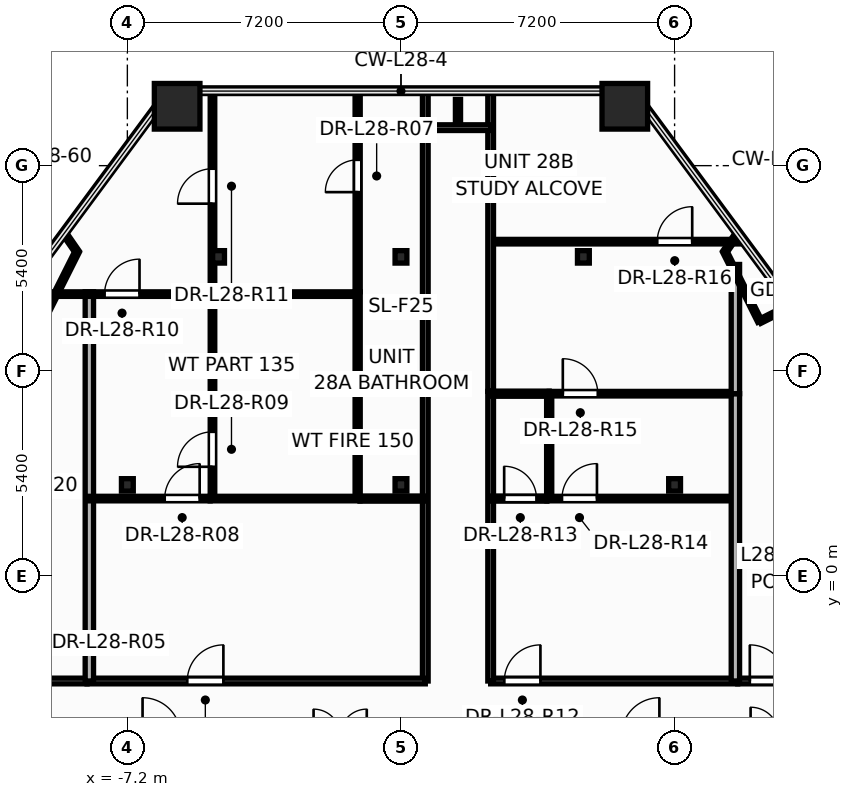
"""IFC4 building model, lengths in metres.
Left out: names, types, materials, properties, quantities, classifications, styles, units other than length and angle.
Written with IfcOpenShell. Run it as: python <this file> out.ifc"""

import sys

from ifc_helpers import new_model, si_unit, direction, frame, frame_2d, origin, origin_2d, place, context, subcontext, project, spatial, rectangle, hollow_rectangle, i_section, extrude, element, fill, save


model = new_model("IFC4")
c1 = context("Model", 3, precision=1e-05, world=origin(), true_north=direction((0.0, 1.0)))
c2 = subcontext(c1, "Body", "Model", "MODEL_VIEW")
j1 = project(units=[si_unit("LENGTHUNIT", "METRE"), si_unit("PLANEANGLEUNIT", "RADIAN")], contexts=[c1])
p1 = place(None, origin())
s1 = spatial("IfcSite", under=j1, at=p1, CompositionType="ELEMENT")
p2 = place(p1, origin())
s2 = spatial("IfcBuilding", under=s1, at=p2, CompositionType="ELEMENT")
p3 = place(p2, frame((0.0, 0.0, 110.4)))
s3 = spatial("IfcBuildingStorey", under=s2, at=p3, CompositionType="ELEMENT", Elevation=110.4)
for number, where, z_axis, x_axis in (
    (1, (5.89, 12.362, 0.0), (0.0, 0.0, 1.0), (1.0, 0.0, 0.0)),
    (2, (-5.89, 12.362, 0.0), (0.0, 0.0, 1.0), (1.0, 0.0, 0.0)),
):
    element("IfcColumn", number, at=place(p3, frame(where, z_axis=z_axis, x_axis=x_axis)), inside=s3, PredefinedType="COLUMN", context=c2, shape_type="SweptSolid", body=[
        extrude(hollow_rectangle(XDim=1.2, YDim=1.2, WallThickness=0.055, at=origin_2d()), origin(), (0.0, 0.0, 1.0), 3.6),
    ])
for number, where, z_axis, x_axis in (
    (3, (-7.2, 2.4, 0.0), (0.0, 0.0, 1.0), (1.0, 0.0, 0.0)),
    (4, (0.0, 2.4, 0.0), (0.0, 0.0, 1.0), (1.0, 0.0, 0.0)),
    (5, (7.2, 2.4, 0.0), (0.0, 0.0, 1.0), (1.0, 0.0, 0.0)),
    (6, (-4.8, 8.4, 0.0), (0.0, 0.0, 1.0), (1.0, 0.0, 0.0)),
    (7, (0.0, 8.4, 0.0), (0.0, 0.0, 1.0), (1.0, 0.0, 0.0)),
    (8, (4.8, 8.4, 0.0), (0.0, 0.0, 1.0), (1.0, 0.0, 0.0)),
):
    element("IfcColumn", number, at=place(p3, frame(where, z_axis=z_axis, x_axis=x_axis)), inside=s3, PredefinedType="COLUMN", context=c2, shape_type="SweptSolid", body=[
        extrude(i_section(OverallWidth=0.311, OverallDepth=0.327, WebThickness=0.016, FlangeThickness=0.025, at=origin_2d()), origin(), (0.0, 0.0, 1.0), 3.6),
    ])
p4 = place(p3, frame((0.64, -2.76, 0.0), z_axis=(0.0, 0.0, 1.0), x_axis=(0.0, 1.0, 0.0)))
e9 = element("IfcWall", 9, at=p4, inside=s3, PredefinedType="PARTITIONING", context=c2, shape_type="SweptSolid", body=[
    extrude(rectangle(XDim=15.522, YDim=0.15, at=frame_2d((7.761, 0.0))), origin(), (0.0, 0.0, 1.0), 2.325),
])
p5 = place(p3, frame((-8.26, -2.76, 0.0), z_axis=(0.0, 0.0, 1.0), x_axis=(1.0, 0.0, 0.0)))
e10 = element("IfcWall", 10, at=p5, inside=s3, PredefinedType="PARTITIONING", context=c2, shape_type="SweptSolid", body=[
    extrude(rectangle(XDim=8.9, YDim=0.15, at=frame_2d((4.45, 0.0))), origin(), (0.0, 0.0, 1.0), 2.325),
])
p6 = place(p5, frame((2.637, 0.0, 0.0)))
e11 = element("IfcOpeningElement", 11, at=p6, cuts=e10, PredefinedType="OPENING", context=c2, shape_type="SweptSolid", body=[
    extrude(rectangle(XDim=0.956, YDim=2.104, at=frame_2d((0.475, 1.052))), frame((0.0, 0.085, 0.0), z_axis=(0.0, -1.0, 0.0), x_axis=(1.0, 0.0, 0.0)), (0.0, 0.0, 1.0), 0.17),
])
p7 = place(p3, frame((2.36, 8.8, 0.0), z_axis=(0.0, 0.0, 1.0), x_axis=(1.0, 0.0, 0.0)))
e12 = element("IfcWall", 12, at=p7, inside=s3, PredefinedType="PARTITIONING", context=c2, shape_type="SweptSolid", body=[
    extrude(rectangle(XDim=6.56, YDim=0.12, at=frame_2d((3.28, 0.0))), origin(), (0.0, 0.0, 1.0), 2.325),
])
p8 = place(p7, frame((4.384, 0.0, 0.0)))
e13 = element("IfcOpeningElement", 13, at=p8, cuts=e12, PredefinedType="OPENING", context=c2, shape_type="SweptSolid", body=[
    extrude(rectangle(XDim=0.926, YDim=2.104, at=frame_2d((0.46, 1.052))), frame((0.0, 0.07, 0.0), z_axis=(0.0, -1.0, 0.0), x_axis=(1.0, 0.0, 0.0)), (0.0, 0.0, 1.0), 0.14),
])
p9 = place(p3, frame((-14.64, -2.76, 0.0), z_axis=(0.0, 0.0, 1.0), x_axis=(1.0, 0.0, 0.0)))
e14 = element("IfcWall", 14, at=p9, inside=s3, PredefinedType="PARTITIONING", context=c2, shape_type="SweptSolid", body=[
    extrude(rectangle(XDim=6.378, YDim=0.15, at=frame_2d((3.189, 0.0))), origin(), (0.0, 0.0, 1.0), 3.35),
])
p10 = place(p9, frame((3.873, 0.0, 0.0)))
e15 = element("IfcOpeningElement", 15, at=p10, cuts=e14, PredefinedType="OPENING", context=c2, shape_type="SweptSolid", body=[
    extrude(rectangle(XDim=0.956, YDim=2.104, at=frame_2d((0.475, 1.052))), frame((0.0, 0.085, 0.0), z_axis=(0.0, -1.0, 0.0), x_axis=(1.0, 0.0, 0.0)), (0.0, 0.0, 1.0), 0.17),
])
p11 = place(p3, frame((2.36, -2.76, 0.0), z_axis=(0.0, 0.0, 1.0), x_axis=(1.0, 0.0, 0.0)))
e16 = element("IfcWall", 16, at=p11, inside=s3, PredefinedType="PARTITIONING", context=c2, shape_type="SweptSolid", body=[
    extrude(rectangle(XDim=6.5, YDim=0.15, at=frame_2d((3.25, 0.0))), origin(), (0.0, 0.0, 1.0), 2.325),
])
p12 = place(p11, frame((0.36, 0.0, 0.0)))
e17 = element("IfcOpeningElement", 17, at=p12, cuts=e16, PredefinedType="OPENING", context=c2, shape_type="SweptSolid", body=[
    extrude(rectangle(XDim=0.956, YDim=2.104, at=frame_2d((0.475, 1.052))), frame((0.0, 0.085, 0.0), z_axis=(0.0, -1.0, 0.0), x_axis=(1.0, 0.0, 0.0)), (0.0, 0.0, 1.0), 0.17),
])
p13 = place(p3, frame((8.862, -2.76, 0.0), z_axis=(0.0, 0.0, 1.0), x_axis=(1.0, 0.0, 0.0)))
e18 = element("IfcWall", 18, at=p13, inside=s3, PredefinedType="PARTITIONING", context=c2, shape_type="SweptSolid", body=[
    extrude(rectangle(XDim=5.778, YDim=0.15, at=frame_2d((2.889, 0.0))), origin(), (0.0, 0.0, 1.0), 3.35),
])
p14 = place(p13, frame((0.317, 0.0, 0.0)))
e19 = element("IfcOpeningElement", 19, at=p14, cuts=e18, PredefinedType="OPENING", context=c2, shape_type="SweptSolid", body=[
    extrude(rectangle(XDim=0.956, YDim=2.104, at=frame_2d((0.475, 1.052))), frame((0.0, 0.085, 0.0), z_axis=(0.0, -1.0, 0.0), x_axis=(1.0, 0.0, 0.0)), (0.0, 0.0, 1.0), 0.17),
])
p15 = place(p3, frame((-8.2, -2.76, 0.0), z_axis=(0.0, 0.0, 1.0), x_axis=(0.0, 1.0, 0.0)))
e20 = element("IfcWall", 20, at=p15, inside=s3, PredefinedType="PARTITIONING", context=c2, shape_type="SweptSolid", body=[
    extrude(rectangle(XDim=10.24, YDim=0.22, at=frame_2d((5.12, 0.0))), origin(), (0.0, 0.0, 1.0), 2.325),
])
p16 = place(p3, frame((-1.14, 2.04, 0.0), z_axis=(0.0, 0.0, 1.0), x_axis=(0.0, 1.0, 0.0)))
e21 = element("IfcWall", 21, at=p16, inside=s3, PredefinedType="PARTITIONING", context=c2, shape_type="SweptSolid", body=[
    extrude(rectangle(XDim=5.44, YDim=0.135, at=frame_2d((2.72, 0.0))), origin(), (0.0, 0.0, 1.0), 2.325),
])
p17 = place(p3, frame((-1.14, 7.482, 0.0), z_axis=(0.0, 0.0, 1.0), x_axis=(0.0, 1.0, 0.0)))
e22 = element("IfcWall", 22, at=p17, inside=s3, PredefinedType="PARTITIONING", context=c2, shape_type="SweptSolid", body=[
    extrude(rectangle(XDim=5.28, YDim=0.135, at=frame_2d((2.64, 0.0))), origin(), (0.0, 0.0, 1.0), 2.325),
])
p18 = place(p17, frame((2.621, 0.0, 0.0)))
e23 = element("IfcOpeningElement", 23, at=p18, cuts=e22, PredefinedType="OPENING", context=c2, shape_type="SweptSolid", body=[
    extrude(rectangle(XDim=0.856, YDim=2.104, at=frame_2d((0.425, 1.052))), frame((0.0, 0.078, 0.0), z_axis=(0.0, -1.0, 0.0), x_axis=(1.0, 0.0, 0.0)), (0.0, 0.0, 1.0), 0.155),
])
p19 = place(p3, frame((-4.96, 2.04, 0.0), z_axis=(0.0, 0.0, 1.0), x_axis=(0.0, 1.0, 0.0)))
e24 = element("IfcWall", 24, at=p19, inside=s3, PredefinedType="PARTITIONING", context=c2, shape_type="SweptSolid", body=[
    extrude(rectangle(XDim=5.38, YDim=0.12, at=frame_2d((2.69, 0.0))), origin(), (0.0, 0.0, 1.0), 2.325),
])
p20 = place(p19, frame((0.837, 0.0, 0.0)))
e25 = element("IfcOpeningElement", 25, at=p20, cuts=e24, PredefinedType="OPENING", context=c2, shape_type="SweptSolid", body=[
    extrude(rectangle(XDim=0.926, YDim=2.104, at=frame_2d((0.46, 1.052))), frame((0.0, 0.07, 0.0), z_axis=(0.0, -1.0, 0.0), x_axis=(1.0, 0.0, 0.0)), (0.0, 0.0, 1.0), 0.14),
])
p21 = place(p3, frame((-4.96, 7.42, 0.0), z_axis=(0.0, 0.0, 1.0), x_axis=(0.0, 1.0, 0.0)))
e26 = element("IfcWall", 26, at=p21, inside=s3, PredefinedType="PARTITIONING", context=c2, shape_type="SweptSolid", body=[
    extrude(rectangle(XDim=5.342, YDim=0.12, at=frame_2d((2.671, 0.0))), origin(), (0.0, 0.0, 1.0), 2.325),
])
p22 = place(p21, frame((2.38, 0.0, 0.0)))
e27 = element("IfcOpeningElement", 27, at=p22, cuts=e26, PredefinedType="OPENING", context=c2, shape_type="SweptSolid", body=[
    extrude(rectangle(XDim=0.926, YDim=2.104, at=frame_2d((0.46, 1.052))), frame((0.0, 0.07, 0.0), z_axis=(0.0, -1.0, 0.0), x_axis=(1.0, 0.0, 0.0)), (0.0, 0.0, 1.0), 0.14),
])
p23 = place(p3, frame((-10.045, 7.42, 0.0), z_axis=(0.0, 0.0, 1.0), x_axis=(1.0, 0.0, 0.0)))
e28 = element("IfcWall", 28, at=p23, inside=s3, PredefinedType="PARTITIONING", context=c2, shape_type="SweptSolid", body=[
    extrude(rectangle(XDim=5.085, YDim=0.12, at=frame_2d((2.543, 0.0))), origin(), (0.0, 0.0, 1.0), 2.325),
])
p24 = place(p23, frame((2.246, 0.0, 0.0)))
e29 = element("IfcOpeningElement", 29, at=p24, cuts=e28, PredefinedType="OPENING", context=c2, shape_type="SweptSolid", body=[
    extrude(rectangle(XDim=0.926, YDim=2.104, at=frame_2d((0.46, 1.052))), frame((0.0, 0.07, 0.0), z_axis=(0.0, -1.0, 0.0), x_axis=(1.0, 0.0, 0.0)), (0.0, 0.0, 1.0), 0.14),
])
p25 = place(p3, frame((3.84, 2.04, 0.0), z_axis=(0.0, 0.0, 1.0), x_axis=(1.0, 0.0, 0.0)))
e30 = element("IfcWall", 30, at=p25, inside=s3, PredefinedType="PARTITIONING", context=c2, shape_type="SweptSolid", body=[
    extrude(rectangle(XDim=4.96, YDim=0.12, at=frame_2d((2.48, 0.0))), origin(), (0.0, 0.0, 1.0), 2.325),
])
p26 = place(p25, frame((0.397, 0.0, 0.0)))
e31 = element("IfcOpeningElement", 31, at=p26, cuts=e30, PredefinedType="OPENING", context=c2, shape_type="SweptSolid", body=[
    extrude(rectangle(XDim=0.926, YDim=2.104, at=frame_2d((0.46, 1.052))), frame((0.0, 0.07, 0.0), z_axis=(0.0, -1.0, 0.0), x_axis=(1.0, 0.0, 0.0)), (0.0, 0.0, 1.0), 0.14),
])
p27 = place(p3, frame((3.9, 4.8, 0.0), z_axis=(0.0, 0.0, 1.0), x_axis=(1.0, 0.0, 0.0)))
e32 = element("IfcWall", 32, at=p27, inside=s3, PredefinedType="PARTITIONING", context=c2, shape_type="SweptSolid", body=[
    extrude(rectangle(XDim=4.9, YDim=0.12, at=frame_2d((2.45, 0.0))), origin(), (0.0, 0.0, 1.0), 2.325),
])
p28 = place(p27, frame((0.359, 0.0, 0.0)))
e33 = element("IfcOpeningElement", 33, at=p28, cuts=e32, PredefinedType="OPENING", context=c2, shape_type="SweptSolid", body=[
    extrude(rectangle(XDim=0.926, YDim=2.104, at=frame_2d((0.46, 1.052))), frame((0.0, 0.07, 0.0), z_axis=(0.0, -1.0, 0.0), x_axis=(1.0, 0.0, 0.0)), (0.0, 0.0, 1.0), 0.14),
])
p29 = place(p3, frame((2.36, -2.76, 0.0), z_axis=(0.0, 0.0, 1.0), x_axis=(0.0, 1.0, 0.0)))
e34 = element("IfcWall", 34, at=p29, inside=s3, PredefinedType="PARTITIONING", context=c2, shape_type="SweptSolid", body=[
    extrude(rectangle(XDim=7.62, YDim=0.15, at=frame_2d((3.81, 0.0))), origin(), (0.0, 0.0, 1.0), 2.325),
])
p30 = place(p3, frame((8.8, -2.76, 0.0), z_axis=(0.0, 0.0, 1.0), x_axis=(0.0, 1.0, 0.0)))
e35 = element("IfcWall", 35, at=p30, inside=s3, PredefinedType="PARTITIONING", context=c2, shape_type="SweptSolid", body=[
    extrude(rectangle(XDim=7.56, YDim=0.22, at=frame_2d((3.78, 0.0))), origin(), (0.0, 0.0, 1.0), 2.325),
])
p31 = place(p3, frame((2.36, 4.862, 0.0), z_axis=(0.0, 0.0, 1.0), x_axis=(0.0, 1.0, 0.0)))
e36 = element("IfcWall", 36, at=p31, inside=s3, PredefinedType="PARTITIONING", context=c2, shape_type="SweptSolid", body=[
    extrude(rectangle(XDim=7.9, YDim=0.15, at=frame_2d((3.95, 0.0))), origin(), (0.0, 0.0, 1.0), 2.325),
])
p32 = place(p3, frame((-5.02, 2.04, 0.0), z_axis=(0.0, 0.0, 1.0), x_axis=(1.0, 0.0, 0.0)))
e37 = element("IfcWall", 37, at=p32, inside=s3, PredefinedType="PARTITIONING", context=c2, shape_type="SweptSolid", body=[
    extrude(rectangle(XDim=3.94, YDim=0.12, at=frame_2d((1.97, 0.0))), origin(), (0.0, 0.0, 1.0), 2.919),
])
p33 = place(p3, frame((-4.96, 7.42, 0.0), z_axis=(0.0, 0.0, 1.0), x_axis=(1.0, 0.0, 0.0)))
e38 = element("IfcWall", 38, at=p33, inside=s3, PredefinedType="PARTITIONING", context=c2, shape_type="SweptSolid", body=[
    extrude(rectangle(XDim=3.82, YDim=0.12, at=frame_2d((1.91, 0.0))), origin(), (0.0, 0.0, 1.0), 2.325),
])
p34 = place(p3, frame((8.8, 4.8, 0.0), z_axis=(0.0, 0.0, 1.0), x_axis=(0.0, 1.0, 0.0)))
e39 = element("IfcWall", 39, at=p34, inside=s3, PredefinedType="PARTITIONING", context=c2, shape_type="SweptSolid", body=[
    extrude(rectangle(XDim=3.4, YDim=0.22, at=frame_2d((1.7, 0.0))), origin(), (0.0, 0.0, 1.0), 2.325),
])
p35 = place(p3, frame((-8.2, 2.04, 0.0), z_axis=(0.0, 0.0, 1.0), x_axis=(1.0, 0.0, 0.0)))
e40 = element("IfcWall", 40, at=p35, inside=s3, PredefinedType="PARTITIONING", context=c2, shape_type="SweptSolid", body=[
    extrude(rectangle(XDim=3.178, YDim=0.12, at=frame_2d((1.589, 0.0))), origin(), (0.0, 0.0, 1.0), 2.325),
])
p36 = place(p35, frame((1.983, 0.0, 0.0)))
e41 = element("IfcOpeningElement", 41, at=p36, cuts=e40, PredefinedType="OPENING", context=c2, shape_type="SweptSolid", body=[
    extrude(rectangle(XDim=0.926, YDim=2.104, at=frame_2d((0.46, 1.052))), frame((0.0, 0.07, 0.0), z_axis=(0.0, -1.0, 0.0), x_axis=(1.0, 0.0, 0.0)), (0.0, 0.0, 1.0), 0.14),
])
p37 = place(p3, frame((3.9, 2.04, 0.0), z_axis=(0.0, 0.0, 1.0), x_axis=(0.0, 1.0, 0.0)))
e42 = element("IfcWall", 42, at=p37, inside=s3, PredefinedType="PARTITIONING", context=c2, shape_type="SweptSolid", body=[
    extrude(rectangle(XDim=2.76, YDim=0.135, at=frame_2d((1.38, 0.0))), origin(), (0.0, 0.0, 1.0), 2.325),
])
for number, where, z_axis, x_axis in (
    (43, (-8.523, 8.533, 0.0), (0.0, 0.0, 1.0), (-0.449, -0.894, 0.0)),
    (44, (9.442, 6.704, 0.0), (0.0, 0.0, 1.0), (-0.449, 0.894, 0.0)),
):
    element("IfcWall", number, at=place(p3, frame(where, z_axis=z_axis, x_axis=x_axis)), inside=s3, PredefinedType="PARTITIONING", context=c2, shape_type="SweptSolid", body=[
        extrude(rectangle(XDim=2.047, YDim=0.12, at=frame_2d((1.024, 0.0))), origin(), (0.0, 0.0, 1.0), 3.35),
    ])
p38 = place(p3, frame((-1.078, 2.04, 0.0), z_axis=(0.0, 0.0, 1.0), x_axis=(1.0, 0.0, 0.0)))
e45 = element("IfcWall", 45, at=p38, inside=s3, PredefinedType="PARTITIONING", context=c2, shape_type="SweptSolid", body=[
    extrude(rectangle(XDim=1.718, YDim=0.135, at=frame_2d((0.859, 0.0))), origin(), (0.0, 0.0, 1.0), 2.325),
])
p39 = place(p3, frame((2.36, 2.04, 0.0), z_axis=(0.0, 0.0, 1.0), x_axis=(1.0, 0.0, 0.0)))
e46 = element("IfcWall", 46, at=p39, inside=s3, PredefinedType="PARTITIONING", context=c2, shape_type="SweptSolid", body=[
    extrude(rectangle(XDim=1.478, YDim=0.135, at=frame_2d((0.739, 0.0))), origin(), (0.0, 0.0, 1.0), 2.919),
])
p40 = place(p39, frame((0.355, 0.0, 0.0)))
e47 = element("IfcOpeningElement", 47, at=p40, cuts=e46, PredefinedType="OPENING", context=c2, shape_type="SweptSolid", body=[
    extrude(rectangle(XDim=0.856, YDim=2.104, at=frame_2d((0.425, 1.052))), frame((0.0, 0.078, 0.0), z_axis=(0.0, -1.0, 0.0), x_axis=(1.0, 0.0, 0.0)), (0.0, 0.0, 1.0), 0.155),
])
p41 = place(p3, frame((2.36, 4.8, 0.0), z_axis=(0.0, 0.0, 1.0), x_axis=(1.0, 0.0, 0.0)))
e48 = element("IfcWall", 48, at=p41, inside=s3, PredefinedType="PARTITIONING", context=c2, shape_type="SweptSolid", body=[
    extrude(rectangle(XDim=1.54, YDim=0.135, at=frame_2d((0.77, 0.0))), origin(), (0.0, 0.0, 1.0), 2.919),
])
p42 = place(p3, frame((0.64, 11.8, 0.0), z_axis=(0.0, 0.0, 1.0), x_axis=(1.0, 0.0, 0.0)))
e49 = element("IfcWall", 49, at=p42, inside=s3, PredefinedType="PARTITIONING", context=c2, shape_type="SweptSolid", body=[
    extrude(rectangle(XDim=1.72, YDim=0.15, at=frame_2d((0.86, 0.0))), origin(), (0.0, 0.0, 1.0), 3.35),
])
p43 = place(p3, frame((10.26, 7.114, 0.0), z_axis=(0.0, 0.0, 1.0), x_axis=(-0.893678540504, -0.448707773771, 0.0)))
e50 = element("IfcWall", 50, at=p43, inside=s3, PredefinedType="PARTITIONING", context=c2, shape_type="SweptSolid", body=[
    extrude(rectangle(XDim=0.915, YDim=0.12, at=frame_2d((0.457, 0.0))), origin(), (0.0, 0.0, 1.0), 2.713),
])
for number, where, z_axis, x_axis in (
    (51, (-8.855, 9.012, 0.0), (0.0, 0.0, 1.0), (0.569, -0.822, 0.0)),
    (52, (8.523, 8.533, 0.0), (0.0, 0.0, 1.0), (0.569, 0.822, 0.0)),
):
    element("IfcWall", number, at=place(p3, frame(where, z_axis=z_axis, x_axis=x_axis)), inside=s3, PredefinedType="PARTITIONING", context=c2, shape_type="SweptSolid", body=[
        extrude(rectangle(XDim=0.582, YDim=0.12, at=frame_2d((0.291, 0.0))), origin(), (0.0, 0.0, 1.0), 2.713),
    ])
p44 = place(p3, frame((1.5, 12.542, 0.0), z_axis=(0.0, 0.0, 1.0), x_axis=(0.0, -1.0, 0.0)))
e53 = element("IfcWall", 53, at=p44, inside=s3, PredefinedType="PARTITIONING", context=c2, shape_type="SweptSolid", body=[
    extrude(rectangle(XDim=0.602, YDim=0.135, at=frame_2d((0.301, 0.0))), origin(), (0.0, 0.0, 1.0), 2.713),
])
p45 = place(p6, origin())
e54 = element("IfcDoor", 54, at=p45, inside=s3, OperationType="SINGLE_SWING_RIGHT", PredefinedType="DOOR", context=c2, shape_type="SweptSolid", body=[
    extrude(rectangle(XDim=0.95, YDim=2.1, at=frame_2d((0.475, 1.05))), frame((0.0, 0.025, 0.0), z_axis=(0.0, -1.0, 0.0), x_axis=(1.0, 0.0, 0.0)), (0.0, 0.0, 1.0), 0.05),
])
fill(e11, e54)
p46 = place(p18, origin())
e55 = element("IfcDoor", 55, at=p46, inside=s3, OperationType="SINGLE_SWING_LEFT", PredefinedType="DOOR", context=c2, shape_type="SweptSolid", body=[
    extrude(rectangle(XDim=0.85, YDim=2.1, at=frame_2d((0.425, 1.05))), frame((0.0, 0.025, 0.0), z_axis=(0.0, -1.0, 0.0), x_axis=(1.0, 0.0, 0.0)), (0.0, 0.0, 1.0), 0.05),
])
fill(e23, e55)
p47 = place(p36, origin())
e56 = element("IfcDoor", 56, at=p47, inside=s3, OperationType="SINGLE_SWING_RIGHT", PredefinedType="DOOR", context=c2, shape_type="SweptSolid", body=[
    extrude(rectangle(XDim=0.92, YDim=2.1, at=frame_2d((0.46, 1.05))), frame((0.0, 0.025, 0.0), z_axis=(0.0, -1.0, 0.0), x_axis=(1.0, 0.0, 0.0)), (0.0, 0.0, 1.0), 0.05),
])
fill(e41, e56)
p48 = place(p20, origin())
e57 = element("IfcDoor", 57, at=p48, inside=s3, OperationType="SINGLE_SWING_LEFT", PredefinedType="DOOR", context=c2, shape_type="SweptSolid", body=[
    extrude(rectangle(XDim=0.92, YDim=2.1, at=frame_2d((0.46, 1.05))), frame((0.0, 0.025, 0.0), z_axis=(0.0, -1.0, 0.0), x_axis=(1.0, 0.0, 0.0)), (0.0, 0.0, 1.0), 0.05),
])
fill(e25, e57)
p49 = place(p24, origin())
e58 = element("IfcDoor", 58, at=p49, inside=s3, OperationType="SINGLE_SWING_RIGHT", PredefinedType="DOOR", context=c2, shape_type="SweptSolid", body=[
    extrude(rectangle(XDim=0.92, YDim=2.1, at=frame_2d((0.46, 1.05))), frame((0.0, 0.025, 0.0), z_axis=(0.0, -1.0, 0.0), x_axis=(1.0, 0.0, 0.0)), (0.0, 0.0, 1.0), 0.05),
])
fill(e29, e58)
p50 = place(p22, origin())
e59 = element("IfcDoor", 59, at=p50, inside=s3, OperationType="SINGLE_SWING_LEFT", PredefinedType="DOOR", context=c2, shape_type="SweptSolid", body=[
    extrude(rectangle(XDim=0.92, YDim=2.1, at=frame_2d((0.46, 1.05))), frame((0.0, 0.025, 0.0), z_axis=(0.0, -1.0, 0.0), x_axis=(1.0, 0.0, 0.0)), (0.0, 0.0, 1.0), 0.05),
])
fill(e27, e59)
p51 = place(p12, origin())
e60 = element("IfcDoor", 60, at=p51, inside=s3, OperationType="SINGLE_SWING_RIGHT", PredefinedType="DOOR", context=c2, shape_type="SweptSolid", body=[
    extrude(rectangle(XDim=0.95, YDim=2.1, at=frame_2d((0.475, 1.05))), frame((0.0, 0.025, 0.0), z_axis=(0.0, -1.0, 0.0), x_axis=(1.0, 0.0, 0.0)), (0.0, 0.0, 1.0), 0.05),
])
fill(e17, e60)
p52 = place(p40, origin())
e61 = element("IfcDoor", 61, at=p52, inside=s3, OperationType="SINGLE_SWING_LEFT", PredefinedType="DOOR", context=c2, shape_type="SweptSolid", body=[
    extrude(rectangle(XDim=0.85, YDim=2.1, at=frame_2d((0.425, 1.05))), frame((0.0, 0.025, 0.0), z_axis=(0.0, -1.0, 0.0), x_axis=(1.0, 0.0, 0.0)), (0.0, 0.0, 1.0), 0.05),
])
fill(e47, e61)
p53 = place(p26, origin())
e62 = element("IfcDoor", 62, at=p53, inside=s3, OperationType="SINGLE_SWING_RIGHT", PredefinedType="DOOR", context=c2, shape_type="SweptSolid", body=[
    extrude(rectangle(XDim=0.92, YDim=2.1, at=frame_2d((0.46, 1.05))), frame((0.0, 0.025, 0.0), z_axis=(0.0, -1.0, 0.0), x_axis=(1.0, 0.0, 0.0)), (0.0, 0.0, 1.0), 0.05),
])
fill(e31, e62)
p54 = place(p28, origin())
e63 = element("IfcDoor", 63, at=p54, inside=s3, OperationType="SINGLE_SWING_LEFT", PredefinedType="DOOR", context=c2, shape_type="SweptSolid", body=[
    extrude(rectangle(XDim=0.92, YDim=2.1, at=frame_2d((0.46, 1.05))), frame((0.0, 0.025, 0.0), z_axis=(0.0, -1.0, 0.0), x_axis=(1.0, 0.0, 0.0)), (0.0, 0.0, 1.0), 0.05),
])
fill(e33, e63)
p55 = place(p8, origin())
e64 = element("IfcDoor", 64, at=p55, inside=s3, OperationType="SINGLE_SWING_RIGHT", PredefinedType="DOOR", context=c2, shape_type="SweptSolid", body=[
    extrude(rectangle(XDim=0.92, YDim=2.1, at=frame_2d((0.46, 1.05))), frame((0.0, 0.025, 0.0), z_axis=(0.0, -1.0, 0.0), x_axis=(1.0, 0.0, 0.0)), (0.0, 0.0, 1.0), 0.05),
])
fill(e13, e64)
p56 = place(p14, origin())
e65 = element("IfcDoor", 65, at=p56, inside=s3, OperationType="SINGLE_SWING_LEFT", PredefinedType="DOOR", context=c2, shape_type="SweptSolid", body=[
    extrude(rectangle(XDim=0.95, YDim=2.1, at=frame_2d((0.475, 1.05))), frame((0.0, 0.025, 0.0), z_axis=(0.0, -1.0, 0.0), x_axis=(1.0, 0.0, 0.0)), (0.0, 0.0, 1.0), 0.05),
])
fill(e19, e65)
save(model, sys.argv[1])
